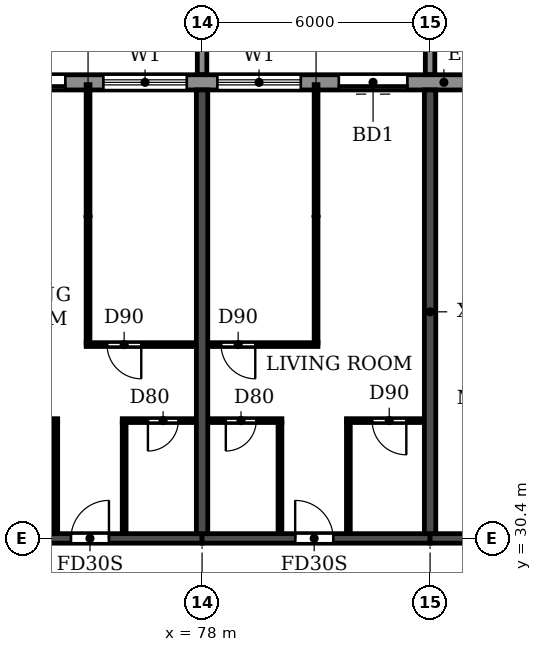
"""IFC4 building model, lengths in metres.
Left out: names, types, materials, properties, quantities, classifications, styles, units other than length and angle.
Written with IfcOpenShell. Run it as: python <this file> out.ifc"""

import sys

from ifc_helpers import new_model, si_unit, direction, frame, frame_2d, origin, place, context, subcontext, project, spatial, polyline, rectangle, outline, extrude, source, transform, mapped, element, fill, save


model = new_model("IFC4")
c1 = context("Model", 3, precision=1e-05, world=origin(), true_north=direction((0.0, 1.0)))
c2 = subcontext(c1, "Body", "Model", "MODEL_VIEW")
j1 = project(units=[si_unit("LENGTHUNIT", "METRE"), si_unit("PLANEANGLEUNIT", "RADIAN")], contexts=[c1])
p1 = place(None, origin())
s1 = spatial("IfcSite", under=j1, at=p1, CompositionType="ELEMENT")
p2 = place(p1, origin())
s2 = spatial("IfcBuilding", under=s1, at=p2, CompositionType="ELEMENT")
p3 = place(p2, frame((0.0, 0.0, 152.1)))
s3 = spatial("IfcBuildingStorey", under=s2, at=p3, CompositionType="ELEMENT", Elevation=152.1)
for number, where, z_axis, x_axis in (
    (1, (78.0, 30.525, 0.0), (0.0, 0.0, 1.0), (0.0, 1.0, 0.0)),
    (2, (84.0, 30.525, 0.0), (0.0, 0.0, 1.0), (0.0, 1.0, 0.0)),
):
    element("IfcWall", number, at=place(p3, frame(where, z_axis=z_axis, x_axis=x_axis)), inside=s3, PredefinedType="SHEAR", context=c2, shape_type="SweptSolid", body=[
        extrude(rectangle(XDim=11.675, YDim=0.3, at=frame_2d((5.837, 0.0))), origin(), (0.0, 0.0, 1.0), 3.07),
    ])
p4 = place(p3, frame((72.0, 30.4, 0.0), z_axis=(0.0, 0.0, 1.0), x_axis=(1.0, 0.0, 0.0)))
e3 = element("IfcWall", 3, at=p4, inside=s3, PredefinedType="SHEAR", context=c2, shape_type="SweptSolid", body=[
    extrude(rectangle(XDim=6.0, YDim=0.25, at=frame_2d((3.0, 0.0))), origin(), (0.0, 0.0, 1.0), 2.47),
])
p5 = place(p4, frame((2.55, 0.0, 0.0)))
e4 = element("IfcOpeningElement", 4, at=p5, cuts=e3, PredefinedType="OPENING", context=c2, shape_type="SweptSolid", body=[
    extrude(rectangle(XDim=1.0, YDim=2.1, at=frame_2d((0.5, 1.05))), frame((0.0, 0.135, 0.0), z_axis=(0.0, -1.0, 0.0), x_axis=(1.0, 0.0, 0.0)), (0.0, 0.0, 1.0), 0.27),
])
p6 = place(p3, frame((78.0, 30.4, 0.0), z_axis=(0.0, 0.0, 1.0), x_axis=(1.0, 0.0, 0.0)))
e5 = element("IfcWall", 5, at=p6, inside=s3, PredefinedType="SHEAR", context=c2, shape_type="SweptSolid", body=[
    extrude(rectangle(XDim=6.0, YDim=0.25, at=frame_2d((3.0, 0.0))), origin(), (0.0, 0.0, 1.0), 2.47),
])
p7 = place(p6, frame((2.45, 0.0, 0.0)))
e6 = element("IfcOpeningElement", 6, at=p7, cuts=e5, PredefinedType="OPENING", context=c2, shape_type="SweptSolid", body=[
    extrude(rectangle(XDim=1.0, YDim=2.1, at=frame_2d((0.5, 1.05))), frame((0.0, 0.135, 0.0), z_axis=(0.0, -1.0, 0.0), x_axis=(1.0, 0.0, 0.0)), (0.0, 0.0, 1.0), 0.27),
])
p8 = place(p3, frame((84.0, 30.4, 0.0), z_axis=(0.0, 0.0, 1.0), x_axis=(1.0, 0.0, 0.0)))
e7 = element("IfcWall", 7, at=p8, inside=s3, PredefinedType="SHEAR", context=c2, shape_type="SweptSolid", body=[
    extrude(rectangle(XDim=5.8, YDim=0.25, at=frame_2d((2.9, 0.0))), origin(), (0.0, 0.0, 1.0), 2.47),
])
p9 = place(p8, frame((2.5, 0.0, 0.0)))
e8 = element("IfcOpeningElement", 8, at=p9, cuts=e7, PredefinedType="OPENING", context=c2, shape_type="SweptSolid", body=[
    extrude(rectangle(XDim=1.0, YDim=2.1, at=frame_2d((0.5, 1.05))), frame((0.0, 0.135, 0.0), z_axis=(0.0, -1.0, 0.0), x_axis=(1.0, 0.0, 0.0)), (0.0, 0.0, 1.0), 0.27),
])
p10 = place(p3, frame((85.317, 42.4, 0.0), z_axis=(0.0, 0.0, 1.0), x_axis=(-1.0, 0.0, 0.0)))
e9 = element("IfcWall", 9, at=p10, inside=s3, PredefinedType="STANDARD", context=c2, shape_type="SweptSolid", body=[
    extrude(rectangle(XDim=68.634, YDim=0.4, at=frame_2d((34.317, 0.0))), origin(), (0.0, 0.0, 1.0), 3.07),
])
p11 = place(p10, frame((64.917, 0.0, 0.0)))
e10 = element("IfcOpeningElement", 10, at=p11, cuts=e9, PredefinedType="OPENING", context=c2, shape_type="SweptSolid", body=[
    extrude(rectangle(XDim=1.8, YDim=2.4, at=frame_2d((0.9, 1.2))), frame((0.0, 0.21, 0.0), z_axis=(0.0, -1.0, 0.0), x_axis=(1.0, 0.0, 0.0)), (0.0, 0.0, 1.0), 0.42),
])
p12 = place(p10, frame((61.717, 0.0, 0.9)))
e11 = element("IfcOpeningElement", 11, at=p12, cuts=e9, PredefinedType="OPENING", context=c2, shape_type="SweptSolid", body=[
    extrude(rectangle(XDim=2.2, YDim=1.5, at=frame_2d((1.1, 0.75))), frame((0.0, 0.21, 0.0), z_axis=(0.0, -1.0, 0.0), x_axis=(1.0, 0.0, 0.0)), (0.0, 0.0, 1.0), 0.42),
])
p13 = place(p10, frame((58.717, 0.0, 0.9)))
e12 = element("IfcOpeningElement", 12, at=p13, cuts=e9, PredefinedType="OPENING", context=c2, shape_type="SweptSolid", body=[
    extrude(rectangle(XDim=2.2, YDim=1.5, at=frame_2d((1.1, 0.75))), frame((0.0, 0.21, 0.0), z_axis=(0.0, -1.0, 0.0), x_axis=(1.0, 0.0, 0.0)), (0.0, 0.0, 1.0), 0.42),
])
p14 = place(p10, frame((55.917, 0.0, 0.0)))
e13 = element("IfcOpeningElement", 13, at=p14, cuts=e9, PredefinedType="OPENING", context=c2, shape_type="SweptSolid", body=[
    extrude(rectangle(XDim=1.8, YDim=2.4, at=frame_2d((0.9, 1.2))), frame((0.0, 0.21, 0.0), z_axis=(0.0, -1.0, 0.0), x_axis=(1.0, 0.0, 0.0)), (0.0, 0.0, 1.0), 0.42),
])
p15 = place(p10, frame((52.917, 0.0, 0.0)))
e14 = element("IfcOpeningElement", 14, at=p15, cuts=e9, PredefinedType="OPENING", context=c2, shape_type="SweptSolid", body=[
    extrude(rectangle(XDim=1.8, YDim=2.4, at=frame_2d((0.9, 1.2))), frame((0.0, 0.21, 0.0), z_axis=(0.0, -1.0, 0.0), x_axis=(1.0, 0.0, 0.0)), (0.0, 0.0, 1.0), 0.42),
])
p16 = place(p10, frame((49.717, 0.0, 0.9)))
e15 = element("IfcOpeningElement", 15, at=p16, cuts=e9, PredefinedType="OPENING", context=c2, shape_type="SweptSolid", body=[
    extrude(rectangle(XDim=2.2, YDim=1.5, at=frame_2d((1.1, 0.75))), frame((0.0, 0.21, 0.0), z_axis=(0.0, -1.0, 0.0), x_axis=(1.0, 0.0, 0.0)), (0.0, 0.0, 1.0), 0.42),
])
p17 = place(p10, frame((46.717, 0.0, 0.9)))
e16 = element("IfcOpeningElement", 16, at=p17, cuts=e9, PredefinedType="OPENING", context=c2, shape_type="SweptSolid", body=[
    extrude(rectangle(XDim=2.2, YDim=1.5, at=frame_2d((1.1, 0.75))), frame((0.0, 0.21, 0.0), z_axis=(0.0, -1.0, 0.0), x_axis=(1.0, 0.0, 0.0)), (0.0, 0.0, 1.0), 0.42),
])
p18 = place(p10, frame((43.717, 0.0, 0.9)))
e17 = element("IfcOpeningElement", 17, at=p18, cuts=e9, PredefinedType="OPENING", context=c2, shape_type="SweptSolid", body=[
    extrude(rectangle(XDim=2.2, YDim=1.5, at=frame_2d((1.1, 0.75))), frame((0.0, 0.21, 0.0), z_axis=(0.0, -1.0, 0.0), x_axis=(1.0, 0.0, 0.0)), (0.0, 0.0, 1.0), 0.42),
])
p19 = place(p10, frame((40.917, 0.0, 0.0)))
e18 = element("IfcOpeningElement", 18, at=p19, cuts=e9, PredefinedType="OPENING", context=c2, shape_type="SweptSolid", body=[
    extrude(rectangle(XDim=1.8, YDim=2.4, at=frame_2d((0.9, 1.2))), frame((0.0, 0.21, 0.0), z_axis=(0.0, -1.0, 0.0), x_axis=(1.0, 0.0, 0.0)), (0.0, 0.0, 1.0), 0.42),
])
p20 = place(p10, frame((37.717, 0.0, 0.9)))
e19 = element("IfcOpeningElement", 19, at=p20, cuts=e9, PredefinedType="OPENING", context=c2, shape_type="SweptSolid", body=[
    extrude(rectangle(XDim=2.2, YDim=1.5, at=frame_2d((1.1, 0.75))), frame((0.0, 0.21, 0.0), z_axis=(0.0, -1.0, 0.0), x_axis=(1.0, 0.0, 0.0)), (0.0, 0.0, 1.0), 0.42),
])
p21 = place(p10, frame((34.917, 0.0, 0.0)))
e20 = element("IfcOpeningElement", 20, at=p21, cuts=e9, PredefinedType="OPENING", context=c2, shape_type="SweptSolid", body=[
    extrude(rectangle(XDim=1.8, YDim=2.4, at=frame_2d((0.9, 1.2))), frame((0.0, 0.21, 0.0), z_axis=(0.0, -1.0, 0.0), x_axis=(1.0, 0.0, 0.0)), (0.0, 0.0, 1.0), 0.42),
])
p22 = place(p10, frame((31.717, 0.0, 0.9)))
e21 = element("IfcOpeningElement", 21, at=p22, cuts=e9, PredefinedType="OPENING", context=c2, shape_type="SweptSolid", body=[
    extrude(rectangle(XDim=2.2, YDim=1.5, at=frame_2d((1.1, 0.75))), frame((0.0, 0.21, 0.0), z_axis=(0.0, -1.0, 0.0), x_axis=(1.0, 0.0, 0.0)), (0.0, 0.0, 1.0), 0.42),
])
p23 = place(p10, frame((28.717, 0.0, 0.9)))
e22 = element("IfcOpeningElement", 22, at=p23, cuts=e9, PredefinedType="OPENING", context=c2, shape_type="SweptSolid", body=[
    extrude(rectangle(XDim=2.2, YDim=1.5, at=frame_2d((1.1, 0.75))), frame((0.0, 0.21, 0.0), z_axis=(0.0, -1.0, 0.0), x_axis=(1.0, 0.0, 0.0)), (0.0, 0.0, 1.0), 0.42),
])
p24 = place(p10, frame((25.717, 0.0, 0.9)))
e23 = element("IfcOpeningElement", 23, at=p24, cuts=e9, PredefinedType="OPENING", context=c2, shape_type="SweptSolid", body=[
    extrude(rectangle(XDim=2.2, YDim=1.5, at=frame_2d((1.1, 0.75))), frame((0.0, 0.21, 0.0), z_axis=(0.0, -1.0, 0.0), x_axis=(1.0, 0.0, 0.0)), (0.0, 0.0, 1.0), 0.42),
])
p25 = place(p10, frame((22.717, 0.0, 0.9)))
e24 = element("IfcOpeningElement", 24, at=p25, cuts=e9, PredefinedType="OPENING", context=c2, shape_type="SweptSolid", body=[
    extrude(rectangle(XDim=2.2, YDim=1.5, at=frame_2d((1.1, 0.75))), frame((0.0, 0.21, 0.0), z_axis=(0.0, -1.0, 0.0), x_axis=(1.0, 0.0, 0.0)), (0.0, 0.0, 1.0), 0.42),
])
p26 = place(p10, frame((19.917, 0.0, 0.0)))
e25 = element("IfcOpeningElement", 25, at=p26, cuts=e9, PredefinedType="OPENING", context=c2, shape_type="SweptSolid", body=[
    extrude(rectangle(XDim=1.8, YDim=2.4, at=frame_2d((0.9, 1.2))), frame((0.0, 0.21, 0.0), z_axis=(0.0, -1.0, 0.0), x_axis=(1.0, 0.0, 0.0)), (0.0, 0.0, 1.0), 0.42),
])
p27 = place(p10, frame((16.717, 0.0, 0.9)))
e26 = element("IfcOpeningElement", 26, at=p27, cuts=e9, PredefinedType="OPENING", context=c2, shape_type="SweptSolid", body=[
    extrude(rectangle(XDim=2.2, YDim=1.5, at=frame_2d((1.1, 0.75))), frame((0.0, 0.21, 0.0), z_axis=(0.0, -1.0, 0.0), x_axis=(1.0, 0.0, 0.0)), (0.0, 0.0, 1.0), 0.42),
])
p28 = place(p10, frame((13.717, 0.0, 0.9)))
e27 = element("IfcOpeningElement", 27, at=p28, cuts=e9, PredefinedType="OPENING", context=c2, shape_type="SweptSolid", body=[
    extrude(rectangle(XDim=2.2, YDim=1.5, at=frame_2d((1.1, 0.75))), frame((0.0, 0.21, 0.0), z_axis=(0.0, -1.0, 0.0), x_axis=(1.0, 0.0, 0.0)), (0.0, 0.0, 1.0), 0.42),
])
p29 = place(p10, frame((10.917, 0.0, 0.0)))
e28 = element("IfcOpeningElement", 28, at=p29, cuts=e9, PredefinedType="OPENING", context=c2, shape_type="SweptSolid", body=[
    extrude(rectangle(XDim=1.8, YDim=2.4, at=frame_2d((0.9, 1.2))), frame((0.0, 0.21, 0.0), z_axis=(0.0, -1.0, 0.0), x_axis=(1.0, 0.0, 0.0)), (0.0, 0.0, 1.0), 0.42),
])
p30 = place(p10, frame((7.717, 0.0, 0.9)))
e29 = element("IfcOpeningElement", 29, at=p30, cuts=e9, PredefinedType="OPENING", context=c2, shape_type="SweptSolid", body=[
    extrude(rectangle(XDim=2.2, YDim=1.5, at=frame_2d((1.1, 0.75))), frame((0.0, 0.21, 0.0), z_axis=(0.0, -1.0, 0.0), x_axis=(1.0, 0.0, 0.0)), (0.0, 0.0, 1.0), 0.42),
])
p31 = place(p10, frame((4.717, 0.0, 0.9)))
e30 = element("IfcOpeningElement", 30, at=p31, cuts=e9, PredefinedType="OPENING", context=c2, shape_type="SweptSolid", body=[
    extrude(rectangle(XDim=2.2, YDim=1.5, at=frame_2d((1.1, 0.75))), frame((0.0, 0.21, 0.0), z_axis=(0.0, -1.0, 0.0), x_axis=(1.0, 0.0, 0.0)), (0.0, 0.0, 1.0), 0.42),
])
p32 = place(p10, frame((1.917, 0.0, 0.0)))
e31 = element("IfcOpeningElement", 31, at=p32, cuts=e9, PredefinedType="OPENING", context=c2, shape_type="SweptSolid", body=[
    extrude(rectangle(XDim=1.8, YDim=2.4, at=frame_2d((0.9, 1.2))), frame((0.0, 0.21, 0.0), z_axis=(0.0, -1.0, 0.0), x_axis=(1.0, 0.0, 0.0)), (0.0, 0.0, 1.0), 0.42),
])
m1 = source(origin(), c2, "Body", "SweptSolid", [
    extrude(outline(polyline([(0.0, 0.0), (0.25, 0.0), (0.25, 3.1), (0.0, 3.1), (0.0, 0.0)])), origin(), (0.0, 0.0, 1.0), 3.1),
])
for number, where in (
    (32, (77.875, 42.6, 0.0)),
    (33, (83.875, 42.6, 0.0)),
):
    element("IfcWall", number, at=place(p3, frame(where)), inside=s3, PredefinedType="STANDARD", context=c2, shape_type="MappedRepresentation", body=[
        mapped(m1, transform((0.0, 0.0, 0.0))),
    ])
p33 = place(p3, frame((72.16, 33.5, 0.0), z_axis=(0.0, 0.0, 1.0), x_axis=(1.0, 0.0, 0.0)))
e34 = element("IfcWall", 34, at=p33, inside=s3, PredefinedType="PARTITIONING", context=c2, shape_type="SweptSolid", body=[
    extrude(rectangle(XDim=2.04, YDim=0.1, at=frame_2d((1.02, 0.0))), origin(), (0.0, 0.0, 1.0), 3.07),
])
p34 = place(p33, frame((0.465, 0.0, 0.0)))
e35 = element("IfcOpeningElement", 35, at=p34, cuts=e34, PredefinedType="OPENING", context=c2, shape_type="SweptSolid", body=[
    extrude(rectangle(XDim=0.9, YDim=2.1, at=frame_2d((0.45, 1.05))), frame((0.0, 0.06, 0.0), z_axis=(0.0, -1.0, 0.0), x_axis=(1.0, 0.0, 0.0)), (0.0, 0.0, 1.0), 0.12),
])
p35 = place(p3, frame((75.9, 33.5, 0.0), z_axis=(0.0, 0.0, 1.0), x_axis=(1.0, 0.0, 0.0)))
e36 = element("IfcWall", 36, at=p35, inside=s3, PredefinedType="PARTITIONING", context=c2, shape_type="SweptSolid", body=[
    extrude(rectangle(XDim=1.94, YDim=0.1, at=frame_2d((0.97, 0.0))), origin(), (0.0, 0.0, 1.0), 3.07),
])
p36 = place(p35, frame((0.675, 0.0, 0.0)))
e37 = element("IfcOpeningElement", 37, at=p36, cuts=e36, PredefinedType="OPENING", context=c2, shape_type="SweptSolid", body=[
    extrude(rectangle(XDim=0.8, YDim=2.1, at=frame_2d((0.4, 1.05))), frame((0.0, 0.06, 0.0), z_axis=(0.0, -1.0, 0.0), x_axis=(1.0, 0.0, 0.0)), (0.0, 0.0, 1.0), 0.12),
])
p37 = place(p3, frame((78.16, 33.5, 0.0), z_axis=(0.0, 0.0, 1.0), x_axis=(1.0, 0.0, 0.0)))
e38 = element("IfcWall", 38, at=p37, inside=s3, PredefinedType="PARTITIONING", context=c2, shape_type="SweptSolid", body=[
    extrude(rectangle(XDim=1.94, YDim=0.1, at=frame_2d((0.97, 0.0))), origin(), (0.0, 0.0, 1.0), 3.07),
])
p38 = place(p37, frame((0.465, 0.0, 0.0)))
e39 = element("IfcOpeningElement", 39, at=p38, cuts=e38, PredefinedType="OPENING", context=c2, shape_type="SweptSolid", body=[
    extrude(rectangle(XDim=0.8, YDim=2.1, at=frame_2d((0.4, 1.05))), frame((0.0, 0.06, 0.0), z_axis=(0.0, -1.0, 0.0), x_axis=(1.0, 0.0, 0.0)), (0.0, 0.0, 1.0), 0.12),
])
p39 = place(p3, frame((81.8, 33.5, 0.0), z_axis=(0.0, 0.0, 1.0), x_axis=(1.0, 0.0, 0.0)))
e40 = element("IfcWall", 40, at=p39, inside=s3, PredefinedType="PARTITIONING", context=c2, shape_type="SweptSolid", body=[
    extrude(rectangle(XDim=2.04, YDim=0.1, at=frame_2d((1.02, 0.0))), origin(), (0.0, 0.0, 1.0), 3.07),
])
p40 = place(p39, frame((0.675, 0.0, 0.0)))
e41 = element("IfcOpeningElement", 41, at=p40, cuts=e40, PredefinedType="OPENING", context=c2, shape_type="SweptSolid", body=[
    extrude(rectangle(XDim=0.9, YDim=2.1, at=frame_2d((0.45, 1.05))), frame((0.0, 0.06, 0.0), z_axis=(0.0, -1.0, 0.0), x_axis=(1.0, 0.0, 0.0)), (0.0, 0.0, 1.0), 0.12),
])
p41 = place(p3, frame((74.95, 35.5, 0.0), z_axis=(0.0, 0.0, 1.0), x_axis=(1.0, 0.0, 0.0)))
e42 = element("IfcWall", 42, at=p41, inside=s3, PredefinedType="PARTITIONING", context=c2, shape_type="SweptSolid", body=[
    extrude(rectangle(XDim=2.89, YDim=0.1, at=frame_2d((1.445, 0.0))), origin(), (0.0, 0.0, 1.0), 3.07),
])
p42 = place(p41, frame((0.55, 0.0, 0.0)))
e43 = element("IfcOpeningElement", 43, at=p42, cuts=e42, PredefinedType="OPENING", context=c2, shape_type="SweptSolid", body=[
    extrude(rectangle(XDim=0.9, YDim=2.1, at=frame_2d((0.45, 1.05))), frame((0.0, 0.06, 0.0), z_axis=(0.0, -1.0, 0.0), x_axis=(1.0, 0.0, 0.0)), (0.0, 0.0, 1.0), 0.12),
])
p43 = place(p3, frame((78.16, 35.5, 0.0), z_axis=(0.0, 0.0, 1.0), x_axis=(1.0, 0.0, 0.0)))
e44 = element("IfcWall", 44, at=p43, inside=s3, PredefinedType="PARTITIONING", context=c2, shape_type="SweptSolid", body=[
    extrude(rectangle(XDim=2.89, YDim=0.1, at=frame_2d((1.445, 0.0))), origin(), (0.0, 0.0, 1.0), 3.07),
])
p44 = place(p43, frame((0.34, 0.0, 0.0)))
e45 = element("IfcOpeningElement", 45, at=p44, cuts=e44, PredefinedType="OPENING", context=c2, shape_type="SweptSolid", body=[
    extrude(rectangle(XDim=0.9, YDim=2.1, at=frame_2d((0.45, 1.05))), frame((0.0, 0.06, 0.0), z_axis=(0.0, -1.0, 0.0), x_axis=(1.0, 0.0, 0.0)), (0.0, 0.0, 1.0), 0.12),
])
p45 = place(p3, frame((74.15, 30.535, 0.0), z_axis=(0.0, 0.0, 1.0), x_axis=(0.0, 1.0, 0.0)))
e46 = element("IfcWall", 46, at=p45, inside=s3, PredefinedType="PARTITIONING", context=c2, shape_type="SweptSolid", body=[
    extrude(rectangle(XDim=2.915, YDim=0.1, at=frame_2d((1.458, 0.0))), origin(), (0.0, 0.0, 1.0), 3.07),
])
p46 = place(p3, frame((75.0, 35.55, 0.0), z_axis=(0.0, 0.0, 1.0), x_axis=(0.0, 1.0, 0.0)))
e47 = element("IfcWall", 47, at=p46, inside=s3, PredefinedType="PARTITIONING", context=c2, shape_type="SweptSolid", body=[
    extrude(rectangle(XDim=6.79, YDim=0.1, at=frame_2d((3.395, 0.0))), origin(), (0.0, 0.0, 1.0), 3.07),
])
for number, where, z_axis, x_axis in (
    (48, (75.95, 30.535, 0.0), (0.0, 0.0, 1.0), (0.0, 1.0, 0.0)),
    (49, (80.05, 30.535, 0.0), (0.0, 0.0, 1.0), (0.0, 1.0, 0.0)),
):
    element("IfcWall", number, at=place(p3, frame(where, z_axis=z_axis, x_axis=x_axis)), inside=s3, PredefinedType="PARTITIONING", context=c2, shape_type="SweptSolid", body=[
        extrude(rectangle(XDim=2.915, YDim=0.1, at=frame_2d((1.458, 0.0))), origin(), (0.0, 0.0, 1.0), 3.07),
    ])
p47 = place(p3, frame((81.0, 35.55, 0.0), z_axis=(0.0, 0.0, 1.0), x_axis=(0.0, 1.0, 0.0)))
e50 = element("IfcWall", 50, at=p47, inside=s3, PredefinedType="PARTITIONING", context=c2, shape_type="SweptSolid", body=[
    extrude(rectangle(XDim=6.79, YDim=0.1, at=frame_2d((3.395, 0.0))), origin(), (0.0, 0.0, 1.0), 3.07),
])
p48 = place(p3, frame((81.85, 30.535, 0.0), z_axis=(0.0, 0.0, 1.0), x_axis=(0.0, 1.0, 0.0)))
e51 = element("IfcWall", 51, at=p48, inside=s3, PredefinedType="PARTITIONING", context=c2, shape_type="SweptSolid", body=[
    extrude(rectangle(XDim=2.915, YDim=0.1, at=frame_2d((1.458, 0.0))), origin(), (0.0, 0.0, 1.0), 3.07),
])
p49 = place(p29, origin())
e52 = element("IfcDoor", 52, at=p49, inside=s3, OperationType="DOUBLE_DOOR_SLIDING", PredefinedType="DOOR", context=c2, shape_type="SweptSolid", body=[
    extrude(rectangle(XDim=1.8, YDim=2.4, at=frame_2d((0.9, 1.2))), frame((0.0, 0.025, 0.0), z_axis=(0.0, -1.0, 0.0), x_axis=(1.0, 0.0, 0.0)), (0.0, 0.0, 1.0), 0.05),
])
fill(e28, e52)
p50 = place(p30, origin())
e53 = element("IfcWindow", 53, at=p50, inside=s3, PartitioningType="DOUBLE_PANEL_HORIZONTAL", PredefinedType="WINDOW", context=c2, shape_type="SweptSolid", body=[
    extrude(rectangle(XDim=2.2, YDim=1.5, at=frame_2d((1.1, 0.75))), frame((0.0, 0.03, 0.0), z_axis=(0.0, -1.0, 0.0), x_axis=(1.0, 0.0, 0.0)), (0.0, 0.0, 1.0), 0.06),
])
fill(e29, e53)
p51 = place(p31, origin())
e54 = element("IfcWindow", 54, at=p51, inside=s3, PartitioningType="DOUBLE_PANEL_HORIZONTAL", PredefinedType="WINDOW", context=c2, shape_type="SweptSolid", body=[
    extrude(rectangle(XDim=2.2, YDim=1.5, at=frame_2d((1.1, 0.75))), frame((0.0, 0.03, 0.0), z_axis=(0.0, -1.0, 0.0), x_axis=(1.0, 0.0, 0.0)), (0.0, 0.0, 1.0), 0.06),
])
fill(e30, e54)
p52 = place(p32, origin())
e55 = element("IfcDoor", 55, at=p52, inside=s3, OperationType="DOUBLE_DOOR_SLIDING", PredefinedType="DOOR", context=c2, shape_type="SweptSolid", body=[
    extrude(rectangle(XDim=1.8, YDim=2.4, at=frame_2d((0.9, 1.2))), frame((0.0, 0.025, 0.0), z_axis=(0.0, -1.0, 0.0), x_axis=(1.0, 0.0, 0.0)), (0.0, 0.0, 1.0), 0.05),
])
fill(e31, e55)
p53 = place(p5, origin())
e56 = element("IfcDoor", 56, at=p53, inside=s3, OperationType="SINGLE_SWING_RIGHT", PredefinedType="DOOR", context=c2, shape_type="SweptSolid", body=[
    extrude(rectangle(XDim=1.0, YDim=2.1, at=frame_2d((0.5, 1.05))), frame((0.0, 0.025, 0.0), z_axis=(0.0, -1.0, 0.0), x_axis=(1.0, 0.0, 0.0)), (0.0, 0.0, 1.0), 0.05),
])
fill(e4, e56)
p54 = place(p42, frame((0.9, 0.0, 0.0), z_axis=(0.0, 0.0, 1.0), x_axis=(-1.0, 0.0, 0.0)))
e57 = element("IfcDoor", 57, at=p54, inside=s3, OperationType="SINGLE_SWING_LEFT", PredefinedType="DOOR", context=c2, shape_type="SweptSolid", body=[
    extrude(rectangle(XDim=0.9, YDim=2.1, at=frame_2d((0.45, 1.05))), frame((0.0, 0.025, 0.0), z_axis=(0.0, -1.0, 0.0), x_axis=(1.0, 0.0, 0.0)), (0.0, 0.0, 1.0), 0.05),
])
fill(e43, e57)
p55 = place(p36, frame((0.8, 0.0, 0.0), z_axis=(0.0, 0.0, 1.0), x_axis=(-1.0, 0.0, 0.0)))
e58 = element("IfcDoor", 58, at=p55, inside=s3, OperationType="SINGLE_SWING_RIGHT", PredefinedType="DOOR", context=c2, shape_type="SweptSolid", body=[
    extrude(rectangle(XDim=0.8, YDim=2.1, at=frame_2d((0.4, 1.05))), frame((0.0, 0.025, 0.0), z_axis=(0.0, -1.0, 0.0), x_axis=(1.0, 0.0, 0.0)), (0.0, 0.0, 1.0), 0.05),
])
fill(e37, e58)
p56 = place(p44, frame((0.9, 0.0, 0.0), z_axis=(0.0, 0.0, 1.0), x_axis=(-1.0, 0.0, 0.0)))
e59 = element("IfcDoor", 59, at=p56, inside=s3, OperationType="SINGLE_SWING_LEFT", PredefinedType="DOOR", context=c2, shape_type="SweptSolid", body=[
    extrude(rectangle(XDim=0.9, YDim=2.1, at=frame_2d((0.45, 1.05))), frame((0.0, 0.025, 0.0), z_axis=(0.0, -1.0, 0.0), x_axis=(1.0, 0.0, 0.0)), (0.0, 0.0, 1.0), 0.05),
])
fill(e45, e59)
p57 = place(p38, frame((0.8, 0.0, 0.0), z_axis=(0.0, 0.0, 1.0), x_axis=(-1.0, 0.0, 0.0)))
e60 = element("IfcDoor", 60, at=p57, inside=s3, OperationType="SINGLE_SWING_RIGHT", PredefinedType="DOOR", context=c2, shape_type="SweptSolid", body=[
    extrude(rectangle(XDim=0.8, YDim=2.1, at=frame_2d((0.4, 1.05))), frame((0.0, 0.025, 0.0), z_axis=(0.0, -1.0, 0.0), x_axis=(1.0, 0.0, 0.0)), (0.0, 0.0, 1.0), 0.05),
])
fill(e39, e60)
p58 = place(p7, origin())
e61 = element("IfcDoor", 61, at=p58, inside=s3, OperationType="SINGLE_SWING_LEFT", PredefinedType="DOOR", context=c2, shape_type="SweptSolid", body=[
    extrude(rectangle(XDim=1.0, YDim=2.1, at=frame_2d((0.5, 1.05))), frame((0.0, 0.025, 0.0), z_axis=(0.0, -1.0, 0.0), x_axis=(1.0, 0.0, 0.0)), (0.0, 0.0, 1.0), 0.05),
])
fill(e6, e61)
p59 = place(p40, frame((0.9, 0.0, 0.0), z_axis=(0.0, 0.0, 1.0), x_axis=(-1.0, 0.0, 0.0)))
e62 = element("IfcDoor", 62, at=p59, inside=s3, OperationType="SINGLE_SWING_LEFT", PredefinedType="DOOR", context=c2, shape_type="SweptSolid", body=[
    extrude(rectangle(XDim=0.9, YDim=2.1, at=frame_2d((0.45, 1.05))), frame((0.0, 0.025, 0.0), z_axis=(0.0, -1.0, 0.0), x_axis=(1.0, 0.0, 0.0)), (0.0, 0.0, 1.0), 0.05),
])
fill(e41, e62)
save(model, sys.argv[1])
